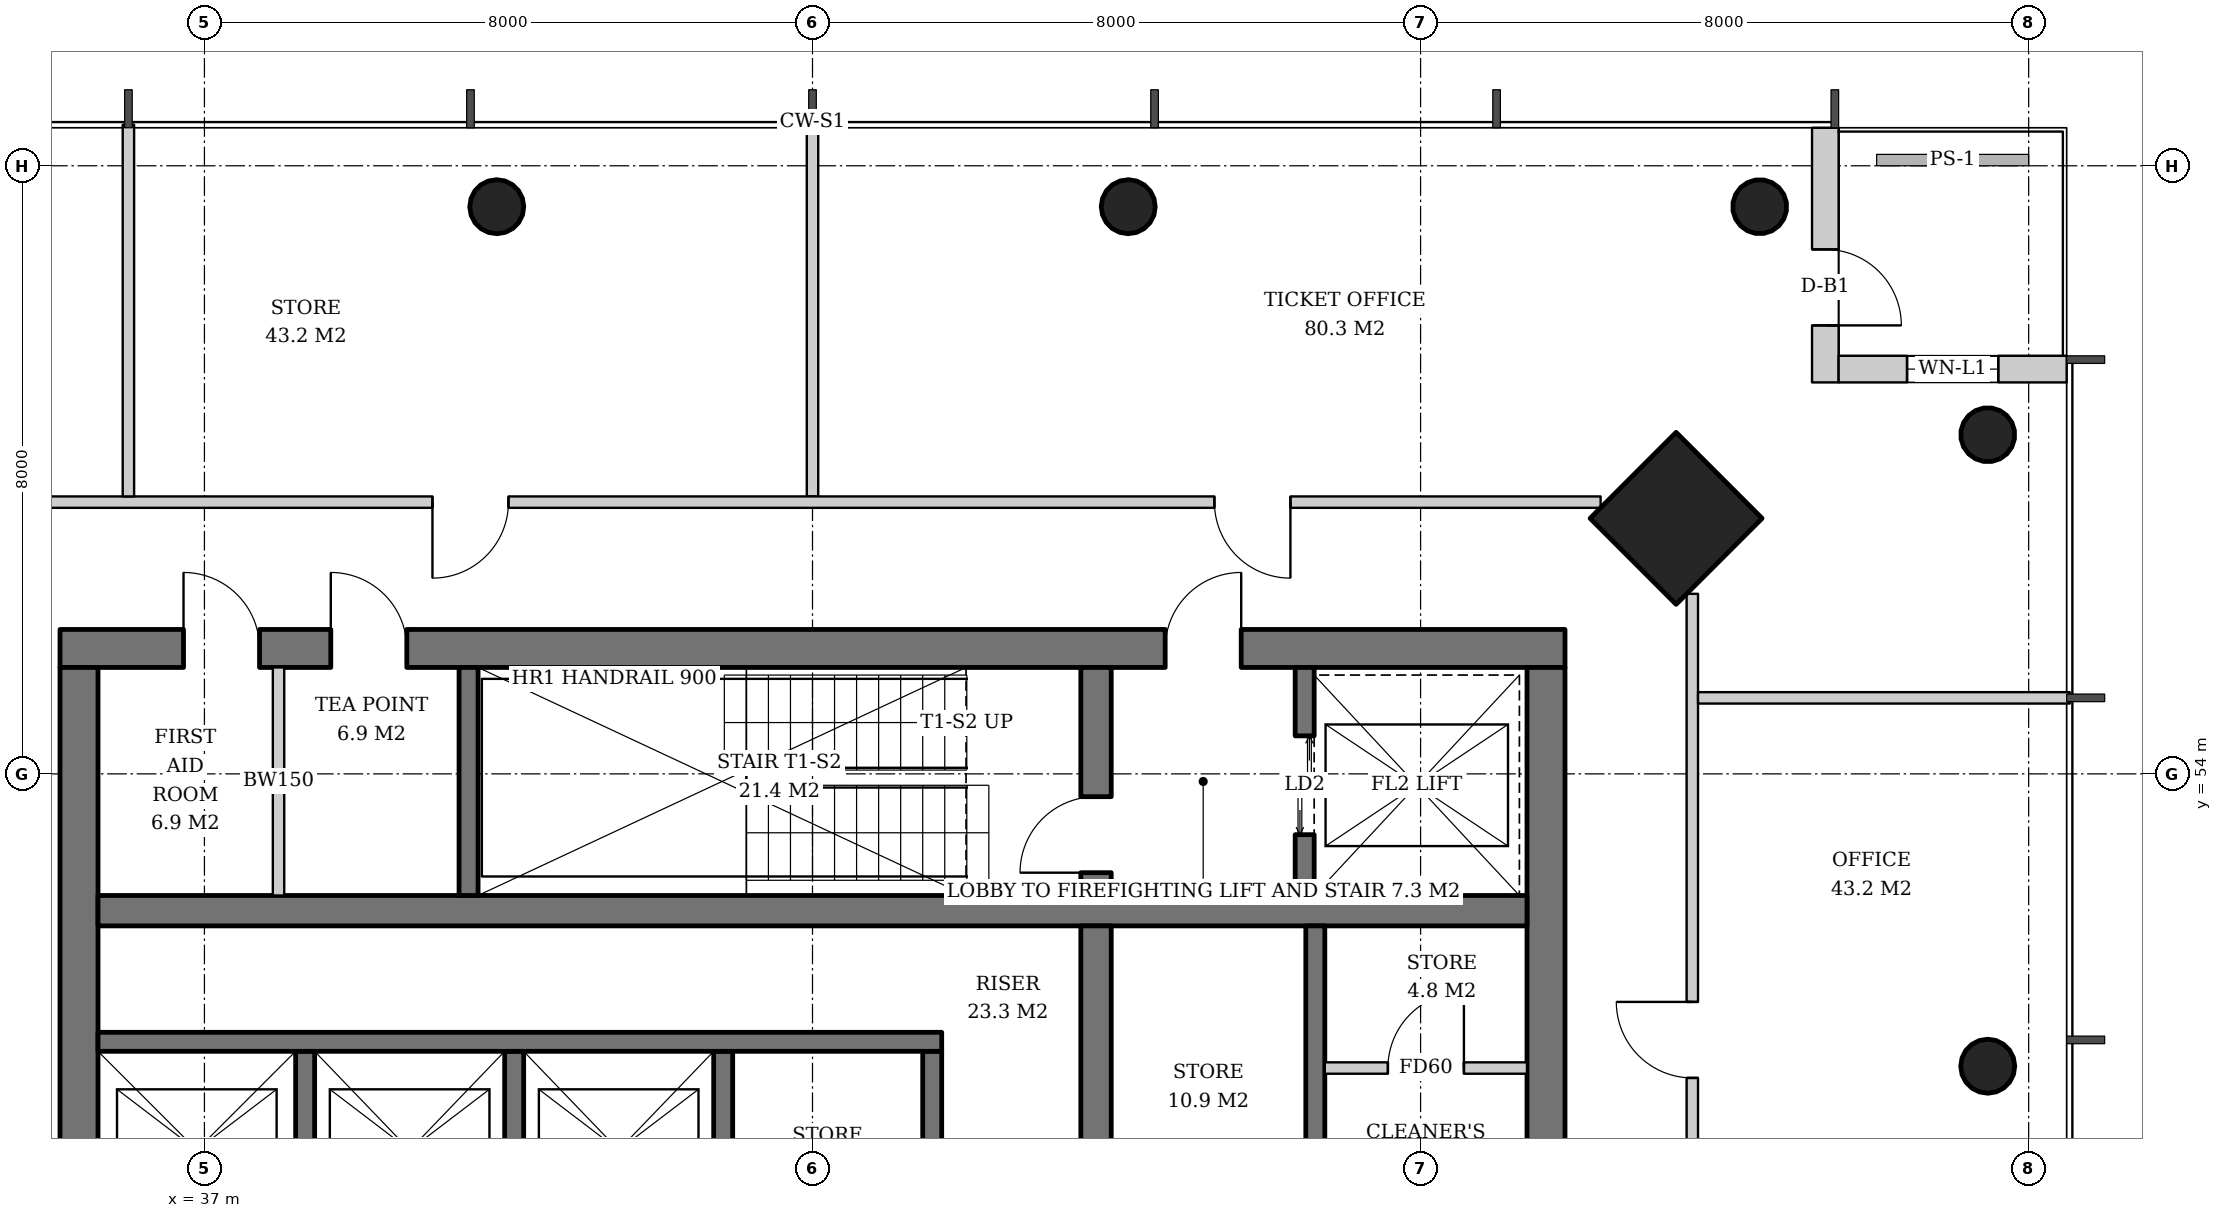
"""IFC4 building model, lengths in metres.
Left out: names, types, materials, properties, quantities, classifications, styles, units other than length and angle.
Written with IfcOpenShell. Run it as: python <this file> out.ifc"""

import sys

from ifc_helpers import new_model, si_unit, direction, frame, frame_2d, origin, origin_2d, place, context, subcontext, project, spatial, rectangle, hollow_circle, extrude, element, fill, save


model = new_model("IFC4")
c1 = context("Model", 3, precision=1e-05, world=origin(), true_north=direction((0.0, 1.0)))
c2 = subcontext(c1, "Body", "Model", "MODEL_VIEW")
j1 = project(units=[si_unit("LENGTHUNIT", "METRE"), si_unit("PLANEANGLEUNIT", "RADIAN")], contexts=[c1])
p1 = place(None, origin())
s1 = spatial("IfcSite", under=j1, at=p1, CompositionType="ELEMENT")
p2 = place(p1, origin())
s2 = spatial("IfcBuilding", under=s1, at=p2, CompositionType="ELEMENT")
p3 = place(p2, frame((0.0, 0.0, 287.0)))
s3 = spatial("IfcBuildingStorey", under=s2, at=p3, CompositionType="ELEMENT", Elevation=287.0)
p4 = place(p3, frame((56.4, 57.4, 0.0), z_axis=(-0.031898107953, -0.031898107953, 0.998981992539), x_axis=(0.707106781187, -0.707106781187, 0.0)))
e1 = element("IfcColumn", 1, at=p4, inside=s3, PredefinedType="COLUMN", context=c2, shape_type="SweptSolid", body=[
    extrude(rectangle(XDim=1.6, YDim=1.6, at=origin_2d()), origin(), (0.0, 0.0, 1.0), 3.804),
])
p5 = place(p3, frame((60.5, 58.5, 0.0), z_axis=(-0.031898107953, -0.031898107953, 0.998981992539), x_axis=(0.707106781187, -0.707106781187, 0.0)))
e2 = element("IfcColumn", 2, at=p5, inside=s3, PredefinedType="COLUMN", context=c2, shape_type="SweptSolid", body=[
    extrude(hollow_circle(Radius=0.355, WallThickness=0.025, at=origin_2d()), origin(), (0.0, 0.0, 1.0), 3.804),
])
p6 = place(p3, frame((60.5, 50.167, 0.0), z_axis=(-0.031912535354, -0.010658915229, 0.999433828532), x_axis=(0.316800238982, -0.948492281772, 0.0)))
e3 = element("IfcColumn", 3, at=p6, inside=s3, PredefinedType="COLUMN", context=c2, shape_type="SweptSolid", body=[
    extrude(hollow_circle(Radius=0.355, WallThickness=0.025, at=origin_2d()), origin(), (0.0, 0.0, 1.0), 3.802),
])
p7 = place(p3, frame((57.5, 61.5, 0.0), z_axis=(-0.031898107953, -0.031898107953, 0.998981992539), x_axis=(0.707106781187, -0.707106781187, 0.0)))
e4 = element("IfcColumn", 4, at=p7, inside=s3, PredefinedType="COLUMN", context=c2, shape_type="SweptSolid", body=[
    extrude(hollow_circle(Radius=0.355, WallThickness=0.025, at=origin_2d()), origin(), (0.0, 0.0, 1.0), 3.804),
])
for number, where, z_axis, x_axis in (
    (5, (49.167, 61.5, 0.0), (-0.011, -0.032, 0.999), (0.948, -0.317, 0.0)),
    (6, (40.833, 61.5, 0.0), (0.011, -0.032, 0.999), (0.948, 0.317, 0.0)),
):
    element("IfcColumn", number, at=place(p3, frame(where, z_axis=z_axis, x_axis=x_axis)), inside=s3, PredefinedType="COLUMN", context=c2, shape_type="SweptSolid", body=[
        extrude(hollow_circle(Radius=0.355, WallThickness=0.025, at=origin_2d()), origin(), (0.0, 0.0, 1.0), 3.802),
    ])
p8 = place(p3, frame((35.1, 55.65, 0.0), z_axis=(0.0, 0.0, 1.0), x_axis=(1.0, 0.0, 0.0)))
e7 = element("IfcWall", 7, at=p8, inside=s3, PredefinedType="SHEAR", context=c2, shape_type="SweptSolid", body=[
    extrude(rectangle(XDim=19.8, YDim=0.5, at=frame_2d((9.9, 0.0))), origin(), (0.0, 0.0, 1.0), 3.8),
])
p9 = place(p8, frame((14.54, 0.0, 0.0)))
e8 = element("IfcOpeningElement", 8, at=p9, cuts=e7, PredefinedType="OPENING", context=c2, shape_type="SweptSolid", body=[
    extrude(rectangle(XDim=1.0, YDim=2.1, at=frame_2d((0.5, 1.05))), frame((0.0, 0.26, 0.0), z_axis=(0.0, -1.0, 0.0), x_axis=(1.0, 0.0, 0.0)), (0.0, 0.0, 1.0), 0.52),
])
p10 = place(p8, frame((1.625, 0.0, 0.0)))
e9 = element("IfcOpeningElement", 9, at=p10, cuts=e7, PredefinedType="OPENING", context=c2, shape_type="SweptSolid", body=[
    extrude(rectangle(XDim=1.0, YDim=2.1, at=frame_2d((0.5, 1.05))), frame((0.0, 0.26, 0.0), z_axis=(0.0, -1.0, 0.0), x_axis=(1.0, 0.0, 0.0)), (0.0, 0.0, 1.0), 0.52),
])
p11 = place(p8, frame((3.562, 0.0, 0.0)))
e10 = element("IfcOpeningElement", 10, at=p11, cuts=e7, PredefinedType="OPENING", context=c2, shape_type="SweptSolid", body=[
    extrude(rectangle(XDim=1.0, YDim=2.1, at=frame_2d((0.5, 1.05))), frame((0.0, 0.26, 0.0), z_axis=(0.0, -1.0, 0.0), x_axis=(1.0, 0.0, 0.0)), (0.0, 0.0, 1.0), 0.52),
])
p12 = place(p3, frame((35.35, 36.6, 0.0), z_axis=(0.0, 0.0, 1.0), x_axis=(0.0, 1.0, 0.0)))
e11 = element("IfcWall", 11, at=p12, inside=s3, PredefinedType="SHEAR", context=c2, shape_type="SweptSolid", body=[
    extrude(rectangle(XDim=18.8, YDim=0.5, at=frame_2d((9.4, 0.0))), origin(), (0.0, 0.0, 1.0), 3.8),
])
p13 = place(p12, frame((8.5, 0.0, 0.0)))
e12 = element("IfcOpeningElement", 12, at=p13, cuts=e11, PredefinedType="OPENING", context=c2, shape_type="SweptSolid", body=[
    extrude(rectangle(XDim=1.8, YDim=2.4, at=frame_2d((0.9, 1.2))), frame((0.0, 0.26, 0.0), z_axis=(0.0, -1.0, 0.0), x_axis=(1.0, 0.0, 0.0)), (0.0, 0.0, 1.0), 0.52),
])
p14 = place(p3, frame((54.65, 36.6, 0.0), z_axis=(0.0, 0.0, 1.0), x_axis=(0.0, 1.0, 0.0)))
e13 = element("IfcWall", 13, at=p14, inside=s3, PredefinedType="SHEAR", context=c2, shape_type="SweptSolid", body=[
    extrude(rectangle(XDim=18.8, YDim=0.5, at=frame_2d((9.4, 0.0))), origin(), (0.0, 0.0, 1.0), 3.8),
])
p15 = place(p14, frame((8.5, 0.0, 0.0)))
e14 = element("IfcOpeningElement", 14, at=p15, cuts=e13, PredefinedType="OPENING", context=c2, shape_type="SweptSolid", body=[
    extrude(rectangle(XDim=1.8, YDim=2.4, at=frame_2d((0.9, 1.2))), frame((0.0, 0.26, 0.0), z_axis=(0.0, -1.0, 0.0), x_axis=(1.0, 0.0, 0.0)), (0.0, 0.0, 1.0), 0.52),
])
p16 = place(p3, frame((35.6, 52.2, 0.0), z_axis=(0.0, 0.0, 1.0), x_axis=(1.0, 0.0, 0.0)))
e15 = element("IfcWall", 15, at=p16, inside=s3, PredefinedType="SHEAR", context=c2, shape_type="SweptSolid", body=[
    extrude(rectangle(XDim=18.8, YDim=0.4, at=frame_2d((9.4, 0.0))), origin(), (0.0, 0.0, 1.0), 3.8),
])
p17 = place(p3, frame((48.73, 40.0, 0.0), z_axis=(0.0, 0.0, 1.0), x_axis=(0.0, 1.0, 0.0)))
e16 = element("IfcWall", 16, at=p17, inside=s3, PredefinedType="SHEAR", context=c2, shape_type="SweptSolid", body=[
    extrude(rectangle(XDim=12.0, YDim=0.4, at=frame_2d((6.0, 0.0))), origin(), (0.0, 0.0, 1.0), 3.8),
])
p18 = place(p3, frame((48.73, 52.4, 0.0), z_axis=(0.0, 0.0, 1.0), x_axis=(0.0, 1.0, 0.0)))
e17 = element("IfcWall", 17, at=p18, inside=s3, PredefinedType="SHEAR", context=c2, shape_type="SweptSolid", body=[
    extrude(rectangle(XDim=3.0, YDim=0.4, at=frame_2d((1.5, 0.0))), origin(), (0.0, 0.0, 1.0), 3.8),
])
p19 = place(p18, frame((0.3, 0.0, 0.0)))
e18 = element("IfcOpeningElement", 18, at=p19, cuts=e17, PredefinedType="OPENING", context=c2, shape_type="SweptSolid", body=[
    extrude(rectangle(XDim=1.0, YDim=2.1, at=frame_2d((0.5, 1.05))), frame((0.0, 0.21, 0.0), z_axis=(0.0, -1.0, 0.0), x_axis=(1.0, 0.0, 0.0)), (0.0, 0.0, 1.0), 0.42),
])
p20 = place(p3, frame((58.325, 62.5, 0.0), z_axis=(0.0, 0.0, 1.0), x_axis=(0.0, -1.0, 0.0)))
e19 = element("IfcWall", 19, at=p20, inside=s3, PredefinedType="SOLIDWALL", context=c2, shape_type="SweptSolid", body=[
    extrude(rectangle(XDim=3.35, YDim=0.35, at=frame_2d((1.675, 0.0))), origin(), (0.0, 0.0, 1.0), 3.55),
])
p21 = place(p20, frame((1.6, 0.0, 0.0)))
e20 = element("IfcOpeningElement", 20, at=p21, cuts=e19, PredefinedType="OPENING", context=c2, shape_type="SweptSolid", body=[
    extrude(rectangle(XDim=1.0, YDim=2.4, at=frame_2d((0.5, 1.2))), frame((0.0, 0.185, 0.0), z_axis=(0.0, -1.0, 0.0), x_axis=(1.0, 0.0, 0.0)), (0.0, 0.0, 1.0), 0.37),
])
p22 = place(p3, frame((58.5, 59.325, 0.0), z_axis=(0.0, 0.0, 1.0), x_axis=(1.0, 0.0, 0.0)))
e21 = element("IfcWall", 21, at=p22, inside=s3, PredefinedType="SOLIDWALL", context=c2, shape_type="SweptSolid", body=[
    extrude(rectangle(XDim=3.0, YDim=0.35, at=frame_2d((1.5, 0.0))), origin(), (0.0, 0.0, 1.0), 3.55),
])
p23 = place(p22, frame((0.9, 0.0, 0.6)))
e22 = element("IfcOpeningElement", 22, at=p23, cuts=e21, PredefinedType="OPENING", context=c2, shape_type="SweptSolid", body=[
    extrude(rectangle(XDim=1.2, YDim=2.55, at=frame_2d((0.6, 1.275))), frame((0.0, 0.185, 0.0), z_axis=(0.0, -1.0, 0.0), x_axis=(1.0, 0.0, 0.0)), (0.0, 0.0, 1.0), 0.37),
])
p24 = place(p3, frame((40.475, 52.4, 0.0), z_axis=(0.0, 0.0, 1.0), x_axis=(0.0, 1.0, 0.0)))
e23 = element("IfcWall", 23, at=p24, inside=s3, PredefinedType="SHEAR", context=c2, shape_type="SweptSolid", body=[
    extrude(rectangle(XDim=3.0, YDim=0.25, at=frame_2d((1.5, 0.0))), origin(), (0.0, 0.0, 1.0), 3.8),
])
p25 = place(p3, frame((51.475, 52.4, 0.0), z_axis=(0.0, 0.0, 1.0), x_axis=(0.0, 1.0, 0.0)))
e24 = element("IfcWall", 24, at=p25, inside=s3, PredefinedType="SHEAR", context=c2, shape_type="SweptSolid", body=[
    extrude(rectangle(XDim=3.0, YDim=0.25, at=frame_2d((1.5, 0.0))), origin(), (0.0, 0.0, 1.0), 3.8),
])
p26 = place(p25, frame((0.8, 0.0, 0.0)))
e25 = element("IfcOpeningElement", 25, at=p26, cuts=e24, PredefinedType="OPENING", context=c2, shape_type="SweptSolid", body=[
    extrude(rectangle(XDim=1.3, YDim=2.2, at=frame_2d((0.65, 1.1))), frame((0.0, 0.135, 0.0), z_axis=(0.0, -1.0, 0.0), x_axis=(1.0, 0.0, 0.0)), (0.0, 0.0, 1.0), 0.27),
])
for number, where, z_axis, x_axis in (
    (26, (38.325, 47.75, 0.0), (0.0, 0.0, 1.0), (0.0, 1.0, 0.0)),
    (27, (41.075, 47.75, 0.0), (0.0, 0.0, 1.0), (0.0, 1.0, 0.0)),
    (28, (43.825, 47.75, 0.0), (0.0, 0.0, 1.0), (0.0, 1.0, 0.0)),
    (29, (46.575, 47.75, 0.0), (0.0, 0.0, 1.0), (0.0, 1.0, 0.0)),
):
    element("IfcWall", number, at=place(p3, frame(where, z_axis=z_axis, x_axis=x_axis)), inside=s3, PredefinedType="SHEAR", context=c2, shape_type="SweptSolid", body=[
        extrude(rectangle(XDim=2.6, YDim=0.25, at=frame_2d((1.3, 0.0))), origin(), (0.0, 0.0, 1.0), 3.8),
    ])
p27 = place(p3, frame((35.6, 50.475, 0.0), z_axis=(0.0, 0.0, 1.0), x_axis=(1.0, 0.0, 0.0)))
e30 = element("IfcWall", 30, at=p27, inside=s3, PredefinedType="SHEAR", context=c2, shape_type="SweptSolid", body=[
    extrude(rectangle(XDim=11.1, YDim=0.25, at=frame_2d((5.55, 0.0))), origin(), (0.0, 0.0, 1.0), 3.8),
])
p28 = place(p3, frame((51.615, 47.75, 0.0), z_axis=(0.0, 0.0, 1.0), x_axis=(0.0, 1.0, 0.0)))
e31 = element("IfcWall", 31, at=p28, inside=s3, PredefinedType="SHEAR", context=c2, shape_type="SweptSolid", body=[
    extrude(rectangle(XDim=4.25, YDim=0.25, at=frame_2d((2.125, 0.0))), origin(), (0.0, 0.0, 1.0), 3.8),
])
p29 = place(p3, frame((37.975, 52.4, 0.0), z_axis=(0.0, 0.0, 1.0), x_axis=(0.0, 1.0, 0.0)))
e32 = element("IfcWall", 32, at=p29, inside=s3, PredefinedType="SOLIDWALL", context=c2, shape_type="SweptSolid", body=[
    extrude(rectangle(XDim=3.0, YDim=0.15, at=frame_2d((1.5, 0.0))), origin(), (0.0, 0.0, 1.0), 3.55),
])
p30 = place(p3, frame((51.74, 50.13, 0.0), z_axis=(0.0, 0.0, 1.0), x_axis=(1.0, 0.0, 0.0)))
e33 = element("IfcWall", 33, at=p30, inside=s3, PredefinedType="SOLIDWALL", context=c2, shape_type="SweptSolid", body=[
    extrude(rectangle(XDim=2.66, YDim=0.15, at=frame_2d((1.33, 0.0))), origin(), (0.0, 0.0, 1.0), 3.55),
])
p31 = place(p30, frame((0.83, 0.0, 0.0)))
e34 = element("IfcOpeningElement", 34, at=p31, cuts=e33, PredefinedType="OPENING", context=c2, shape_type="SweptSolid", body=[
    extrude(rectangle(XDim=1.0, YDim=2.1, at=frame_2d((0.5, 1.05))), frame((0.0, 0.085, 0.0), z_axis=(0.0, -1.0, 0.0), x_axis=(1.0, 0.0, 0.0)), (0.0, 0.0, 1.0), 0.17),
])
p32 = place(p3, frame((56.575, 35.631, 0.0), z_axis=(0.0, 0.0, 1.0), x_axis=(0.0, 1.0, 0.0)))
e35 = element("IfcWall", 35, at=p32, inside=s3, PredefinedType="PARTITIONING", context=c2, shape_type="SweptSolid", body=[
    extrude(rectangle(XDim=20.737, YDim=0.15, at=frame_2d((10.369, 0.0))), origin(), (0.0, 0.0, 1.0), 2.95),
])
p33 = place(p32, frame((4.081, 0.0, 0.0)))
e36 = element("IfcOpeningElement", 36, at=p33, cuts=e35, PredefinedType="OPENING", context=c2, shape_type="SweptSolid", body=[
    extrude(rectangle(XDim=1.0, YDim=2.1, at=frame_2d((0.5, 1.05))), frame((0.0, 0.085, 0.0), z_axis=(0.0, -1.0, 0.0), x_axis=(1.0, 0.0, 0.0)), (0.0, 0.0, 1.0), 0.17),
])
p34 = place(p32, frame((14.369, 0.0, 0.0)))
e37 = element("IfcOpeningElement", 37, at=p34, cuts=e35, PredefinedType="OPENING", context=c2, shape_type="SweptSolid", body=[
    extrude(rectangle(XDim=1.0, YDim=2.1, at=frame_2d((0.5, 1.05))), frame((0.0, 0.085, 0.0), z_axis=(0.0, -1.0, 0.0), x_axis=(1.0, 0.0, 0.0)), (0.0, 0.0, 1.0), 0.17),
])
for number, where, z_axis, x_axis in (
    (38, (56.65, 55.0, 0.0), (0.0, 0.0, 1.0), (1.0, 0.0, 0.0)),
    (39, (45.0, 57.65, 0.0), (0.0, 0.0, 1.0), (0.0, 1.0, 0.0)),
):
    element("IfcWall", number, at=place(p3, frame(where, z_axis=z_axis, x_axis=x_axis)), inside=s3, PredefinedType="PARTITIONING", context=c2, shape_type="SweptSolid", body=[
        extrude(rectangle(XDim=4.89, YDim=0.15, at=frame_2d((2.445, 0.0))), origin(), (0.0, 0.0, 1.0), 3.05),
    ])
p35 = place(p3, frame((55.369, 57.575, 0.0), z_axis=(0.0, 0.0, 1.0), x_axis=(-1.0, 0.0, 0.0)))
e40 = element("IfcWall", 40, at=p35, inside=s3, PredefinedType="PARTITIONING", context=c2, shape_type="SweptSolid", body=[
    extrude(rectangle(XDim=20.737, YDim=0.15, at=frame_2d((10.369, 0.0))), origin(), (0.0, 0.0, 1.0), 2.95),
])
p36 = place(p35, frame((4.081, 0.0, 0.0)))
e41 = element("IfcOpeningElement", 41, at=p36, cuts=e40, PredefinedType="OPENING", context=c2, shape_type="SweptSolid", body=[
    extrude(rectangle(XDim=1.0, YDim=2.1, at=frame_2d((0.5, 1.05))), frame((0.0, 0.085, 0.0), z_axis=(0.0, -1.0, 0.0), x_axis=(1.0, 0.0, 0.0)), (0.0, 0.0, 1.0), 0.17),
])
p37 = place(p35, frame((14.369, 0.0, 0.0)))
e42 = element("IfcOpeningElement", 42, at=p37, cuts=e40, PredefinedType="OPENING", context=c2, shape_type="SweptSolid", body=[
    extrude(rectangle(XDim=1.0, YDim=2.1, at=frame_2d((0.5, 1.05))), frame((0.0, 0.085, 0.0), z_axis=(0.0, -1.0, 0.0), x_axis=(1.0, 0.0, 0.0)), (0.0, 0.0, 1.0), 0.17),
])
p38 = place(p3, frame((36.0, 57.65, 0.0), z_axis=(0.0, 0.0, 1.0), x_axis=(0.0, 1.0, 0.0)))
e43 = element("IfcWall", 43, at=p38, inside=s3, PredefinedType="PARTITIONING", context=c2, shape_type="SweptSolid", body=[
    extrude(rectangle(XDim=4.89, YDim=0.15, at=frame_2d((2.445, 0.0))), origin(), (0.0, 0.0, 1.0), 3.05),
])
p39 = place(p21, origin())
e44 = element("IfcDoor", 44, at=p39, inside=s3, OperationType="SINGLE_SWING_RIGHT", PredefinedType="DOOR", context=c2, shape_type="SweptSolid", body=[
    extrude(rectangle(XDim=1.0, YDim=2.4, at=frame_2d((0.5, 1.2))), frame((0.0, 0.025, 0.0), z_axis=(0.0, -1.0, 0.0), x_axis=(1.0, 0.0, 0.0)), (0.0, 0.0, 1.0), 0.05),
])
fill(e20, e44)
p40 = place(p23, origin())
e45 = element("IfcWindow", 45, at=p40, inside=s3, PartitioningType="SINGLE_PANEL", PredefinedType="WINDOW", context=c2, shape_type="SweptSolid", body=[
    extrude(rectangle(XDim=1.2, YDim=2.55, at=frame_2d((0.6, 1.275))), frame((0.0, 0.03, 0.0), z_axis=(0.0, -1.0, 0.0), x_axis=(1.0, 0.0, 0.0)), (0.0, 0.0, 1.0), 0.06),
])
fill(e22, e45)
p41 = place(p26, origin())
e46 = element("IfcDoor", 46, at=p41, inside=s3, OperationType="DOUBLE_DOOR_SLIDING", PredefinedType="DOOR", context=c2, shape_type="SweptSolid", body=[
    extrude(rectangle(XDim=1.3, YDim=2.2, at=frame_2d((0.65, 1.1))), frame((0.0, 0.025, 0.0), z_axis=(0.0, -1.0, 0.0), x_axis=(1.0, 0.0, 0.0)), (0.0, 0.0, 1.0), 0.05),
])
fill(e25, e46)
p42 = place(p31, origin())
e47 = element("IfcDoor", 47, at=p42, inside=s3, OperationType="SINGLE_SWING_RIGHT", PredefinedType="DOOR", context=c2, shape_type="SweptSolid", body=[
    extrude(rectangle(XDim=1.0, YDim=2.1, at=frame_2d((0.5, 1.05))), frame((0.0, 0.025, 0.0), z_axis=(0.0, -1.0, 0.0), x_axis=(1.0, 0.0, 0.0)), (0.0, 0.0, 1.0), 0.05),
])
fill(e34, e47)
p43 = place(p19, origin())
e48 = element("IfcDoor", 48, at=p43, inside=s3, OperationType="SINGLE_SWING_LEFT", PredefinedType="DOOR", context=c2, shape_type="SweptSolid", body=[
    extrude(rectangle(XDim=1.0, YDim=2.1, at=frame_2d((0.5, 1.05))), frame((0.0, 0.025, 0.0), z_axis=(0.0, -1.0, 0.0), x_axis=(1.0, 0.0, 0.0)), (0.0, 0.0, 1.0), 0.05),
])
fill(e18, e48)
p44 = place(p9, origin())
e49 = element("IfcDoor", 49, at=p44, inside=s3, OperationType="SINGLE_SWING_RIGHT", PredefinedType="DOOR", context=c2, shape_type="SweptSolid", body=[
    extrude(rectangle(XDim=1.0, YDim=2.1, at=frame_2d((0.5, 1.05))), frame((0.0, 0.025, 0.0), z_axis=(0.0, -1.0, 0.0), x_axis=(1.0, 0.0, 0.0)), (0.0, 0.0, 1.0), 0.05),
])
fill(e8, e49)
p45 = place(p10, origin())
e50 = element("IfcDoor", 50, at=p45, inside=s3, OperationType="SINGLE_SWING_LEFT", PredefinedType="DOOR", context=c2, shape_type="SweptSolid", body=[
    extrude(rectangle(XDim=1.0, YDim=2.1, at=frame_2d((0.5, 1.05))), frame((0.0, -0.19, 0.0), z_axis=(0.0, -1.0, 0.0), x_axis=(1.0, 0.0, 0.0)), (0.0, 0.0, 1.0), 0.05),
])
fill(e9, e50)
p46 = place(p11, origin())
e51 = element("IfcDoor", 51, at=p46, inside=s3, OperationType="SINGLE_SWING_LEFT", PredefinedType="DOOR", context=c2, shape_type="SweptSolid", body=[
    extrude(rectangle(XDim=1.0, YDim=2.1, at=frame_2d((0.5, 1.05))), frame((0.0, -0.19, 0.0), z_axis=(0.0, -1.0, 0.0), x_axis=(1.0, 0.0, 0.0)), (0.0, 0.0, 1.0), 0.05),
])
fill(e10, e51)
p47 = place(p34, origin())
e52 = element("IfcDoor", 52, at=p47, inside=s3, OperationType="SINGLE_SWING_RIGHT", PredefinedType="DOOR", context=c2, shape_type="SweptSolid", body=[
    extrude(rectangle(XDim=1.0, YDim=2.1, at=frame_2d((0.5, 1.05))), frame((0.0, 0.025, 0.0), z_axis=(0.0, -1.0, 0.0), x_axis=(1.0, 0.0, 0.0)), (0.0, 0.0, 1.0), 0.05),
])
fill(e37, e52)
p48 = place(p36, origin())
e53 = element("IfcDoor", 53, at=p48, inside=s3, OperationType="SINGLE_SWING_LEFT", PredefinedType="DOOR", context=c2, shape_type="SweptSolid", body=[
    extrude(rectangle(XDim=1.0, YDim=2.1, at=frame_2d((0.5, 1.05))), frame((0.0, 0.025, 0.0), z_axis=(0.0, -1.0, 0.0), x_axis=(1.0, 0.0, 0.0)), (0.0, 0.0, 1.0), 0.05),
])
fill(e41, e53)
p49 = place(p37, origin())
e54 = element("IfcDoor", 54, at=p49, inside=s3, OperationType="SINGLE_SWING_RIGHT", PredefinedType="DOOR", context=c2, shape_type="SweptSolid", body=[
    extrude(rectangle(XDim=1.0, YDim=2.1, at=frame_2d((0.5, 1.05))), frame((0.0, 0.025, 0.0), z_axis=(0.0, -1.0, 0.0), x_axis=(1.0, 0.0, 0.0)), (0.0, 0.0, 1.0), 0.05),
])
fill(e42, e54)
save(model, sys.argv[1])
